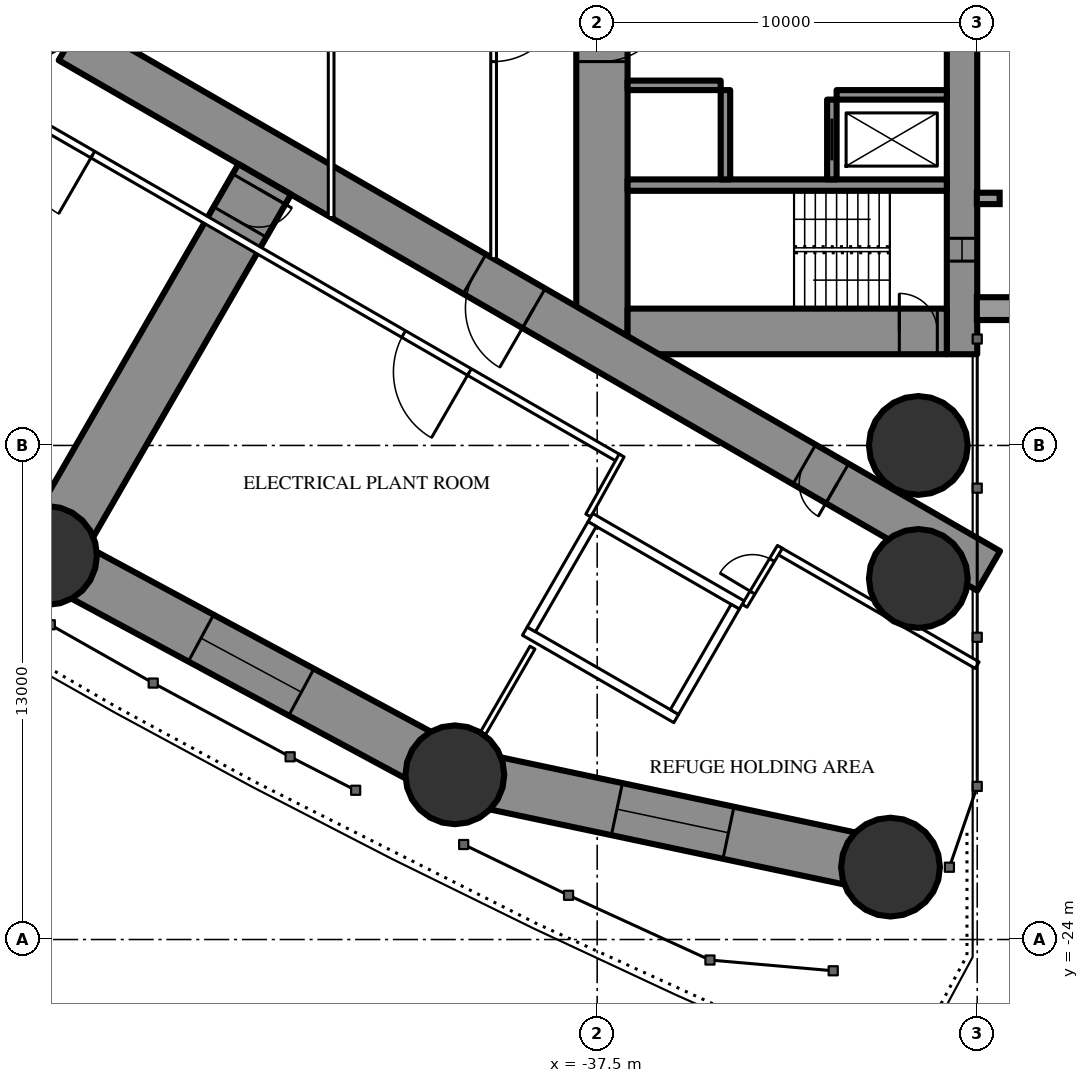
"""IFC4 building model, lengths in metres.
Left out: names, types, materials, properties, quantities, classifications, styles, units other than length and angle.
Written with IfcOpenShell. Run it as: python <this file> out.ifc"""

import sys

from ifc_helpers import new_model, si_unit, direction, frame, frame_2d, origin, origin_2d, place, context, subcontext, project, spatial, rectangle, hollow_circle, extrude, element, fill, save


model = new_model("IFC4")
c1 = context("Model", 3, precision=1e-05, world=origin(), true_north=direction((0.0, 1.0)))
c2 = subcontext(c1, "Body", "Model", "MODEL_VIEW")
j1 = project(units=[si_unit("LENGTHUNIT", "METRE"), si_unit("PLANEANGLEUNIT", "RADIAN")], contexts=[c1])
p1 = place(None, origin())
s1 = spatial("IfcSite", under=j1, at=p1, CompositionType="ELEMENT")
p2 = place(p1, origin())
s2 = spatial("IfcBuilding", under=s1, at=p2, CompositionType="ELEMENT")
p3 = place(p2, frame((0.0, 0.0, 87.0)))
s3 = spatial("IfcBuildingStorey", under=s2, at=p3, CompositionType="ELEMENT", Elevation=87.0)
for number, where, z_axis, x_axis in (
    (1, (-29.781, -22.095, 0.0), (0.0, 0.0, 1.0), (1.0, 0.0, 0.0)),
    (2, (-29.05, -11.0, 0.0), (0.0, 0.0, 1.0), (1.0, 0.0, 0.0)),
    (3, (-29.05, -14.5, 0.0), (0.0, 0.0, 1.0), (1.0, 0.0, 0.0)),
    (4, (-51.963, -13.895, 0.0), (0.0, 0.0, 1.0), (1.0, 0.0, 0.0)),
    (5, (-41.245, -19.666, 0.0), (0.0, 0.0, 1.0), (1.0, 0.0, 0.0)),
):
    element("IfcColumn", number, at=place(p3, frame(where, z_axis=z_axis, x_axis=x_axis)), inside=s3, PredefinedType="COLUMN", context=c2, shape_type="SweptSolid", body=[
        extrude(hollow_circle(Radius=1.3, WallThickness=0.1, at=origin_2d()), origin(), (0.0, 0.0, 1.0), 3.6),
    ])
p4 = place(p3, frame((-27.9, 8.6, 0.0), z_axis=(0.0, 0.0, 1.0), x_axis=(0.0, -1.0, 0.0)))
e6 = element("IfcWall", 6, at=p4, inside=s3, PredefinedType="SHEAR", context=c2, shape_type="SweptSolid", body=[
    extrude(rectangle(XDim=17.2, YDim=0.8, at=frame_2d((8.6, 0.0))), origin(), (0.0, 0.0, 1.0), 3.6),
])
p5 = place(p4, frame((2.45, 0.0, 0.6)))
e7 = element("IfcOpeningElement", 7, at=p5, cuts=e6, PredefinedType="OPENING", context=c2, shape_type="SweptSolid", body=[
    extrude(rectangle(XDim=0.6, YDim=2.1, at=frame_2d((0.3, 1.05))), frame((0.0, 0.41, 0.0), z_axis=(0.0, -1.0, 0.0), x_axis=(1.0, 0.0, 0.0)), (0.0, 0.0, 1.0), 0.82),
])
p6 = place(p4, frame((14.15, 0.0, 0.6)))
e8 = element("IfcOpeningElement", 8, at=p6, cuts=e6, PredefinedType="OPENING", context=c2, shape_type="SweptSolid", body=[
    extrude(rectangle(XDim=0.6, YDim=2.1, at=frame_2d((0.3, 1.05))), frame((0.0, 0.41, 0.0), z_axis=(0.0, -1.0, 0.0), x_axis=(1.0, 0.0, 0.0)), (0.0, 0.0, 1.0), 0.82),
])
p7 = place(p3, frame((-37.375, 8.6, 0.0), z_axis=(0.0, 0.0, 1.0), x_axis=(0.0, -1.0, 0.0)))
e9 = element("IfcWall", 9, at=p7, inside=s3, PredefinedType="SHEAR", context=c2, shape_type="SweptSolid", body=[
    extrude(rectangle(XDim=17.2, YDim=1.35, at=frame_2d((8.6, 0.0))), origin(), (0.0, 0.0, 1.0), 3.6),
])
p8 = place(p7, frame((7.7, 0.0, 0.0)))
e10 = element("IfcOpeningElement", 10, at=p8, cuts=e9, PredefinedType="OPENING", context=c2, shape_type="SweptSolid", body=[
    extrude(rectangle(XDim=1.8, YDim=2.2, at=frame_2d((0.9, 1.1))), frame((0.0, 0.685, 0.0), z_axis=(0.0, -1.0, 0.0), x_axis=(1.0, 0.0, 0.0)), (0.0, 0.0, 1.0), 1.37),
])
p9 = place(p3, frame((-28.3, -8.0, 0.0), z_axis=(0.0, 0.0, 1.0), x_axis=(-1.0, 0.0, 0.0)))
e11 = element("IfcWall", 11, at=p9, inside=s3, PredefinedType="SHEAR", context=c2, shape_type="SweptSolid", body=[
    extrude(rectangle(XDim=8.4, YDim=1.2, at=frame_2d((4.2, 0.0))), origin(), (0.0, 0.0, 1.0), 3.6),
])
p10 = place(p9, frame((0.25, 0.0, 0.0)))
e12 = element("IfcOpeningElement", 12, at=p10, cuts=e11, PredefinedType="OPENING", context=c2, shape_type="SweptSolid", body=[
    extrude(rectangle(XDim=1.0, YDim=2.2, at=frame_2d((0.5, 1.1))), frame((0.0, 0.61, 0.0), z_axis=(0.0, -1.0, 0.0), x_axis=(1.0, 0.0, 0.0)), (0.0, 0.0, 1.0), 1.22),
])
p11 = place(p3, frame((-28.3, -4.15, 0.0), z_axis=(0.0, 0.0, 1.0), x_axis=(-1.0, 0.0, 0.0)))
e13 = element("IfcWall", 13, at=p11, inside=s3, PredefinedType="SHEAR", context=c2, shape_type="SweptSolid", body=[
    extrude(rectangle(XDim=8.4, YDim=0.3, at=frame_2d((4.2, 0.0))), origin(), (0.0, 0.0, 1.0), 3.6),
])
p12 = place(p3, frame((-31.325, -1.9, 0.0), z_axis=(0.0, 0.0, 1.0), x_axis=(0.0, -1.0, 0.0)))
e14 = element("IfcWall", 14, at=p12, inside=s3, PredefinedType="SHEAR", context=c2, shape_type="SweptSolid", body=[
    extrude(rectangle(XDim=2.1, YDim=0.25, at=frame_2d((1.05, 0.0))), origin(), (0.0, 0.0, 1.0), 3.6),
])
p13 = place(p12, frame((0.5, 0.0, 0.0)))
e15 = element("IfcOpeningElement", 15, at=p13, cuts=e14, PredefinedType="OPENING", context=c2, shape_type="SweptSolid", body=[
    extrude(rectangle(XDim=1.1, YDim=2.2, at=frame_2d((0.55, 1.1))), frame((0.0, 0.135, 0.0), z_axis=(0.0, -1.0, 0.0), x_axis=(1.0, 0.0, 0.0)), (0.0, 0.0, 1.0), 0.27),
])
p14 = place(p3, frame((-34.125, -1.65, 0.0), z_axis=(0.0, 0.0, 1.0), x_axis=(0.0, -1.0, 0.0)))
e16 = element("IfcWall", 16, at=p14, inside=s3, PredefinedType="SHEAR", context=c2, shape_type="SweptSolid", body=[
    extrude(rectangle(XDim=2.35, YDim=0.25, at=frame_2d((1.175, 0.0))), origin(), (0.0, 0.0, 1.0), 3.6),
])
p15 = place(p3, frame((-28.3, -1.775, 0.0), z_axis=(0.0, 0.0, 1.0), x_axis=(-1.0, 0.0, 0.0)))
e17 = element("IfcWall", 17, at=p15, inside=s3, PredefinedType="SHEAR", context=c2, shape_type="SweptSolid", body=[
    extrude(rectangle(XDim=2.9, YDim=0.25, at=frame_2d((1.45, 0.0))), origin(), (0.0, 0.0, 1.0), 3.6),
])
p16 = place(p3, frame((-34.25, -1.525, 0.0), z_axis=(0.0, 0.0, 1.0), x_axis=(-1.0, 0.0, 0.0)))
e18 = element("IfcWall", 18, at=p16, inside=s3, PredefinedType="SHEAR", context=c2, shape_type="SweptSolid", body=[
    extrude(rectangle(XDim=2.45, YDim=0.25, at=frame_2d((1.225, 0.0))), origin(), (0.0, 0.0, 1.0), 3.6),
])
p17 = place(p3, frame((-27.2, 14.3, 0.0), z_axis=(0.0, 0.0, 1.0), x_axis=(-0.866026593062, -0.499997940104, 0.0)))
e19 = element("IfcWall", 19, at=p17, inside=s3, PredefinedType="SHEAR", context=c2, shape_type="SweptSolid", body=[
    extrude(rectangle(XDim=28.946, YDim=1.2, at=frame_2d((14.473, 0.0))), origin(), (0.0, 0.0, 1.0), 3.6),
])
p18 = place(p17, frame((4.6, 0.0, 0.0)))
e20 = element("IfcOpeningElement", 20, at=p18, cuts=e19, PredefinedType="OPENING", context=c2, shape_type="SweptSolid", body=[
    extrude(rectangle(XDim=1.0, YDim=2.2, at=frame_2d((0.5, 1.1))), frame((0.0, 0.61, 0.0), z_axis=(0.0, -1.0, 0.0), x_axis=(1.0, 0.0, 0.0)), (0.0, 0.0, 1.0), 1.22),
])
p19 = place(p17, frame((13.568, 0.0, 0.0)))
e21 = element("IfcOpeningElement", 21, at=p19, cuts=e19, PredefinedType="OPENING", context=c2, shape_type="SweptSolid", body=[
    extrude(rectangle(XDim=1.8, YDim=2.03, at=frame_2d((0.9, 1.015))), frame((0.0, 0.61, 0.0), z_axis=(0.0, -1.0, 0.0), x_axis=(1.0, 0.0, 0.0)), (0.0, 0.0, 1.0), 1.22),
])
p20 = place(p3, frame((-27.2, -14.3, 0.0), z_axis=(0.0, 0.0, 1.0), x_axis=(-0.866024021859, 0.500002393557, 0.0)))
e22 = element("IfcWall", 22, at=p20, inside=s3, PredefinedType="SHEAR", context=c2, shape_type="SweptSolid", body=[
    extrude(rectangle(XDim=27.907, YDim=1.2, at=frame_2d((13.954, 0.0))), origin(), (0.0, 0.0, 1.0), 3.6),
])
p21 = place(p20, frame((4.6, 0.0, 0.0)))
e23 = element("IfcOpeningElement", 23, at=p21, cuts=e22, PredefinedType="OPENING", context=c2, shape_type="SweptSolid", body=[
    extrude(rectangle(XDim=1.0, YDim=2.2, at=frame_2d((0.5, 1.1))), frame((0.0, 0.61, 0.0), z_axis=(0.0, -1.0, 0.0), x_axis=(1.0, 0.0, 0.0)), (0.0, 0.0, 1.0), 1.22),
])
p22 = place(p20, frame((13.818, 0.0, 0.0)))
e24 = element("IfcOpeningElement", 24, at=p22, cuts=e22, PredefinedType="OPENING", context=c2, shape_type="SweptSolid", body=[
    extrude(rectangle(XDim=1.8, YDim=2.2, at=frame_2d((0.9, 1.1))), frame((0.0, 0.61, 0.0), z_axis=(0.0, -1.0, 0.0), x_axis=(1.0, 0.0, 0.0)), (0.0, 0.0, 1.0), 1.22),
])
p23 = place(p3, frame((-46.248, -3.996, 0.0), z_axis=(0.0, 0.0, 1.0), x_axis=(-0.499993613132, -0.866029091213, 0.0)))
e25 = element("IfcWall", 25, at=p23, inside=s3, PredefinedType="SHEAR", context=c2, shape_type="SweptSolid", body=[
    extrude(rectangle(XDim=11.431, YDim=1.6, at=frame_2d((5.715, 0.0))), origin(), (0.0, 0.0, 1.0), 3.6),
])
p24 = place(p23, frame((0.3, 0.0, 0.0)))
e26 = element("IfcOpeningElement", 26, at=p24, cuts=e25, PredefinedType="OPENING", context=c2, shape_type="SweptSolid", body=[
    extrude(rectangle(XDim=1.0, YDim=2.2, at=frame_2d((0.5, 1.1))), frame((0.0, 0.81, 0.0), z_axis=(0.0, -1.0, 0.0), x_axis=(1.0, 0.0, 0.0)), (0.0, 0.0, 1.0), 1.62),
])
p25 = place(p3, frame((-62.287, -7.445, 0.0), z_axis=(0.0, 0.0, 1.0), x_axis=(0.848062521637, -0.529896177939, 0.0)))
e27 = element("IfcWall", 27, at=p25, inside=s3, PredefinedType="SHEAR", context=c2, shape_type="SweptSolid", body=[
    extrude(rectangle(XDim=12.173, YDim=1.4, at=frame_2d((6.086, 0.0))), origin(), (0.0, 0.0, 1.0), 3.6),
])
p26 = place(p25, frame((4.586, 0.0, 0.6)))
e28 = element("IfcOpeningElement", 28, at=p26, cuts=e27, PredefinedType="OPENING", context=c2, shape_type="SweptSolid", body=[
    extrude(rectangle(XDim=3.0, YDim=1.2, at=frame_2d((1.5, 0.6))), frame((0.0, 0.71, 0.0), z_axis=(0.0, -1.0, 0.0), x_axis=(1.0, 0.0, 0.0)), (0.0, 0.0, 1.0), 1.42),
])
p27 = place(p3, frame((-51.963, -13.895, 0.0), z_axis=(0.0, 0.0, 1.0), x_axis=(0.880492350889, -0.474060354835, 0.0)))
e29 = element("IfcWall", 29, at=p27, inside=s3, PredefinedType="SHEAR", context=c2, shape_type="SweptSolid", body=[
    extrude(rectangle(XDim=12.173, YDim=1.4, at=frame_2d((6.086, 0.0))), origin(), (0.0, 0.0, 1.0), 3.6),
])
p28 = place(p27, frame((4.586, 0.0, 0.6)))
e30 = element("IfcOpeningElement", 30, at=p28, cuts=e29, PredefinedType="OPENING", context=c2, shape_type="SweptSolid", body=[
    extrude(rectangle(XDim=3.0, YDim=1.2, at=frame_2d((1.5, 0.6))), frame((0.0, 0.71, 0.0), z_axis=(0.0, -1.0, 0.0), x_axis=(1.0, 0.0, 0.0)), (0.0, 0.0, 1.0), 1.42),
])
p29 = place(p3, frame((-41.245, -19.666, 0.0), z_axis=(0.0, 0.0, 1.0), x_axis=(0.978282156247, -0.207277646573, 0.0)))
e31 = element("IfcWall", 31, at=p29, inside=s3, PredefinedType="SHEAR", context=c2, shape_type="SweptSolid", body=[
    extrude(rectangle(XDim=11.718, YDim=1.4, at=frame_2d((5.859, 0.0))), origin(), (0.0, 0.0, 1.0), 3.6),
])
p30 = place(p29, frame((4.359, 0.0, 0.6)))
e32 = element("IfcOpeningElement", 32, at=p30, cuts=e31, PredefinedType="OPENING", context=c2, shape_type="SweptSolid", body=[
    extrude(rectangle(XDim=3.0, YDim=1.2, at=frame_2d((1.5, 0.6))), frame((0.0, 0.71, 0.0), z_axis=(0.0, -1.0, 0.0), x_axis=(1.0, 0.0, 0.0)), (0.0, 0.0, 1.0), 1.42),
])
p31 = place(p3, frame((-39.202, -16.32, 0.0), z_axis=(0.0, 0.0, 1.0), x_axis=(-0.49997716683, -0.86603858612, 0.0)))
e33 = element("IfcWall", 33, at=p31, inside=s3, PredefinedType="PARTITIONING", context=c2, shape_type="SweptSolid", body=[
    extrude(rectangle(XDim=2.6, YDim=0.15, at=frame_2d((1.3, 0.0))), origin(), (0.0, 0.0, 1.0), 3.35),
])
p32 = place(p3, frame((-27.5, -16.782, 0.0), z_axis=(0.0, 0.0, 1.0), x_axis=(-0.866030050624, 0.499991951352, 0.0)))
e34 = element("IfcWall", 34, at=p32, inside=s3, PredefinedType="PARTITIONING", context=c2, shape_type="SweptSolid", body=[
    extrude(rectangle(XDim=6.038, YDim=0.2, at=frame_2d((3.019, 0.0))), origin(), (0.0, 0.0, 1.0), 3.35),
])
p33 = place(p3, frame((-36.92, -11.344, 0.0), z_axis=(0.0, 0.0, 1.0), x_axis=(-0.866028313256, 0.499994960614, 0.0)))
e35 = element("IfcWall", 35, at=p33, inside=s3, PredefinedType="PARTITIONING", context=c2, shape_type="SweptSolid", body=[
    extrude(rectangle(XDim=22.568, YDim=0.2, at=frame_2d((11.284, 0.0))), origin(), (0.0, 0.0, 1.0), 3.35),
])
p34 = place(p33, frame((15.994, 0.0, 0.0)))
e36 = element("IfcOpeningElement", 36, at=p34, cuts=e35, PredefinedType="OPENING", context=c2, shape_type="SweptSolid", body=[
    extrude(rectangle(XDim=1.8, YDim=2.2, at=frame_2d((0.9, 1.1))), frame((0.0, 0.11, 0.0), z_axis=(0.0, -1.0, 0.0), x_axis=(1.0, 0.0, 0.0)), (0.0, 0.0, 1.0), 0.22),
])
p35 = place(p33, frame((4.551, 0.0, 0.0)))
e37 = element("IfcOpeningElement", 37, at=p35, cuts=e35, PredefinedType="OPENING", context=c2, shape_type="SweptSolid", body=[
    extrude(rectangle(XDim=2.0, YDim=2.4, at=frame_2d((1.0, 1.2))), frame((0.0, 0.11, 0.0), z_axis=(0.0, -1.0, 0.0), x_axis=(1.0, 0.0, 0.0)), (0.0, 0.0, 1.0), 0.22),
])
p36 = place(p3, frame((-36.857, -11.265, 0.0), z_axis=(0.0, 0.0, 1.0), x_axis=(-0.485482130951, -0.874246590229, 0.0)))
e38 = element("IfcWall", 38, at=p36, inside=s3, PredefinedType="PARTITIONING", context=c2, shape_type="SweptSolid", body=[
    extrude(rectangle(XDim=1.805, YDim=0.15, at=frame_2d((0.902, 0.0))), origin(), (0.0, 0.0, 1.0), 3.35),
])
p37 = place(p3, frame((-33.621, -15.218, 0.0), z_axis=(0.0, 0.0, 1.0), x_axis=(0.514336634837, 0.857588377991, 0.0)))
e39 = element("IfcWall", 39, at=p37, inside=s3, PredefinedType="PARTITIONING", context=c2, shape_type="SweptSolid", body=[
    extrude(rectangle(XDim=1.805, YDim=0.15, at=frame_2d((0.903, 0.0))), origin(), (0.0, 0.0, 1.0), 3.35),
])
p38 = place(p37, frame((0.403, 0.0, 0.0)))
e40 = element("IfcOpeningElement", 40, at=p38, cuts=e39, PredefinedType="OPENING", context=c2, shape_type="SweptSolid", body=[
    extrude(rectangle(XDim=1.0, YDim=2.03, at=frame_2d((0.5, 1.015))), frame((0.0, 0.085, 0.0), z_axis=(0.0, -1.0, 0.0), x_axis=(1.0, 0.0, 0.0)), (0.0, 0.0, 1.0), 0.17),
])
p39 = place(p3, frame((-40.225, 6.087, 0.0), z_axis=(0.0, 0.0, 1.0), x_axis=(0.0, -1.0, 0.0)))
e41 = element("IfcWall", 41, at=p39, inside=s3, PredefinedType="PARTITIONING", context=c2, shape_type="SweptSolid", body=[
    extrude(rectangle(XDim=12.174, YDim=0.15, at=frame_2d((6.087, 0.0))), origin(), (0.0, 0.0, 1.0), 3.35),
])
p40 = place(p39, frame((5.187, 0.0, 0.0)))
e42 = element("IfcOpeningElement", 42, at=p40, cuts=e41, PredefinedType="OPENING", context=c2, shape_type="SweptSolid", body=[
    extrude(rectangle(XDim=1.8, YDim=2.2, at=frame_2d((0.9, 1.1))), frame((0.0, 0.085, 0.0), z_axis=(0.0, -1.0, 0.0), x_axis=(1.0, 0.0, 0.0)), (0.0, 0.0, 1.0), 0.17),
])
p41 = place(p3, frame((-44.5, 4.169, 0.0), z_axis=(0.0, 0.0, 1.0), x_axis=(0.0, -1.0, 0.0)))
e43 = element("IfcWall", 43, at=p41, inside=s3, PredefinedType="PARTITIONING", context=c2, shape_type="SweptSolid", body=[
    extrude(rectangle(XDim=9.173, YDim=0.15, at=frame_2d((4.587, 0.0))), origin(), (0.0, 0.0, 1.0), 3.35),
])
p42 = place(p41, frame((3.669, 0.0, 0.0)))
e44 = element("IfcOpeningElement", 44, at=p42, cuts=e43, PredefinedType="OPENING", context=c2, shape_type="SweptSolid", body=[
    extrude(rectangle(XDim=1.0, YDim=2.2, at=frame_2d((0.5, 1.1))), frame((0.0, 0.085, 0.0), z_axis=(0.0, -1.0, 0.0), x_axis=(1.0, 0.0, 0.0)), (0.0, 0.0, 1.0), 0.17),
])
p43 = place(p3, frame((-33.696, -15.197, 0.0), z_axis=(0.0, 0.0, 1.0), x_axis=(-0.865976953817, 0.500083908417, 0.0)))
e45 = element("IfcWall", 45, at=p43, inside=s3, PredefinedType="PARTITIONING", context=c2, shape_type="SweptSolid", body=[
    extrude(rectangle(XDim=4.599, YDim=0.25, at=frame_2d((2.3, 0.0))), origin(), (0.0, 0.0, 1.0), 3.35),
])
p44 = place(p3, frame((-35.42, -18.186, 0.0), z_axis=(0.0, 0.0, 1.0), x_axis=(-0.865990227814, 0.50006092162, 0.0)))
e46 = element("IfcWall", 46, at=p44, inside=s3, PredefinedType="PARTITIONING", context=c2, shape_type="SweptSolid", body=[
    extrude(rectangle(XDim=4.6, YDim=0.25, at=frame_2d((2.3, 0.0))), origin(), (0.0, 0.0, 1.0), 3.35),
])
p45 = place(p3, frame((-33.866, -15.243, 0.0), z_axis=(0.0, 0.0, 1.0), x_axis=(-0.499929347863, -0.866066190972, 0.0)))
e47 = element("IfcWall", 47, at=p45, inside=s3, PredefinedType="PARTITIONING", context=c2, shape_type="SweptSolid", body=[
    extrude(rectangle(XDim=3.201, YDim=0.25, at=frame_2d((1.6, 0.0))), origin(), (0.0, 0.0, 1.0), 3.35),
])
p46 = place(p3, frame((-37.633, -13.068, 0.0), z_axis=(0.0, 0.0, 1.0), x_axis=(-0.499872130319, -0.866099216793, 0.0)))
e48 = element("IfcWall", 48, at=p46, inside=s3, PredefinedType="PARTITIONING", context=c2, shape_type="SweptSolid", body=[
    extrude(rectangle(XDim=3.2, YDim=0.25, at=frame_2d((1.6, 0.0))), origin(), (0.0, 0.0, 1.0), 3.35),
])
p47 = place(p28, origin())
e49 = element("IfcWindow", 49, at=p47, inside=s3, PartitioningType="SINGLE_PANEL", PredefinedType="WINDOW", context=c2, shape_type="SweptSolid", body=[
    extrude(rectangle(XDim=3.0, YDim=1.2, at=frame_2d((1.5, 0.6))), frame((0.0, 0.03, 0.0), z_axis=(0.0, -1.0, 0.0), x_axis=(1.0, 0.0, 0.0)), (0.0, 0.0, 1.0), 0.06),
])
fill(e30, e49)
p48 = place(p30, origin())
e50 = element("IfcWindow", 50, at=p48, inside=s3, PartitioningType="SINGLE_PANEL", PredefinedType="WINDOW", context=c2, shape_type="SweptSolid", body=[
    extrude(rectangle(XDim=3.0, YDim=1.2, at=frame_2d((1.5, 0.6))), frame((0.0, 0.03, 0.0), z_axis=(0.0, -1.0, 0.0), x_axis=(1.0, 0.0, 0.0)), (0.0, 0.0, 1.0), 0.06),
])
fill(e32, e50)
p49 = place(p24, origin())
e51 = element("IfcDoor", 51, at=p49, inside=s3, OperationType="SINGLE_SWING_LEFT", PredefinedType="DOOR", context=c2, shape_type="SweptSolid", body=[
    extrude(rectangle(XDim=1.0, YDim=2.2, at=frame_2d((0.5, 1.1))), frame((0.0, 0.025, 0.0), z_axis=(0.0, -1.0, 0.0), x_axis=(1.0, 0.0, 0.0)), (0.0, 0.0, 1.0), 0.05),
])
fill(e26, e51)
p50 = place(p34, origin())
e52 = element("IfcDoor", 52, at=p50, inside=s3, OperationType="DOUBLE_DOOR_SINGLE_SWING", PredefinedType="DOOR", context=c2, shape_type="SweptSolid", body=[
    extrude(rectangle(XDim=1.8, YDim=2.2, at=frame_2d((0.9, 1.1))), frame((0.0, 0.025, 0.0), z_axis=(0.0, -1.0, 0.0), x_axis=(1.0, 0.0, 0.0)), (0.0, 0.0, 1.0), 0.05),
])
fill(e36, e52)
p51 = place(p35, origin())
e53 = element("IfcDoor", 53, at=p51, inside=s3, OperationType="DOUBLE_DOOR_SINGLE_SWING", PredefinedType="DOOR", context=c2, shape_type="SweptSolid", body=[
    extrude(rectangle(XDim=2.0, YDim=2.4, at=frame_2d((1.0, 1.2))), frame((0.0, 0.025, 0.0), z_axis=(0.0, -1.0, 0.0), x_axis=(1.0, 0.0, 0.0)), (0.0, 0.0, 1.0), 0.05),
])
fill(e37, e53)
p52 = place(p38, origin())
e54 = element("IfcDoor", 54, at=p52, inside=s3, OperationType="SINGLE_SWING_LEFT", PredefinedType="DOOR", context=c2, shape_type="SweptSolid", body=[
    extrude(rectangle(XDim=1.0, YDim=2.03, at=frame_2d((0.5, 1.015))), frame((0.0, 0.025, 0.0), z_axis=(0.0, -1.0, 0.0), x_axis=(1.0, 0.0, 0.0)), (0.0, 0.0, 1.0), 0.05),
])
fill(e40, e54)
p53 = place(p40, origin())
e55 = element("IfcDoor", 55, at=p53, inside=s3, OperationType="DOUBLE_DOOR_SINGLE_SWING", PredefinedType="DOOR", context=c2, shape_type="SweptSolid", body=[
    extrude(rectangle(XDim=1.8, YDim=2.2, at=frame_2d((0.9, 1.1))), frame((0.0, 0.025, 0.0), z_axis=(0.0, -1.0, 0.0), x_axis=(1.0, 0.0, 0.0)), (0.0, 0.0, 1.0), 0.05),
])
fill(e42, e55)
p54 = place(p21, origin())
e56 = element("IfcDoor", 56, at=p54, inside=s3, OperationType="SINGLE_SWING_LEFT", PredefinedType="DOOR", context=c2, shape_type="SweptSolid", body=[
    extrude(rectangle(XDim=1.0, YDim=2.2, at=frame_2d((0.5, 1.1))), frame((0.0, 0.025, 0.0), z_axis=(0.0, -1.0, 0.0), x_axis=(1.0, 0.0, 0.0)), (0.0, 0.0, 1.0), 0.05),
])
fill(e23, e56)
p55 = place(p22, origin())
e57 = element("IfcDoor", 57, at=p55, inside=s3, OperationType="DOUBLE_DOOR_SINGLE_SWING", PredefinedType="DOOR", context=c2, shape_type="SweptSolid", body=[
    extrude(rectangle(XDim=1.8, YDim=2.2, at=frame_2d((0.9, 1.1))), frame((0.0, 0.025, 0.0), z_axis=(0.0, -1.0, 0.0), x_axis=(1.0, 0.0, 0.0)), (0.0, 0.0, 1.0), 0.05),
])
fill(e24, e57)
p56 = place(p8, origin())
e58 = element("IfcDoor", 58, at=p56, inside=s3, OperationType="DOUBLE_DOOR_SINGLE_SWING", PredefinedType="DOOR", context=c2, shape_type="SweptSolid", body=[
    extrude(rectangle(XDim=1.8, YDim=2.2, at=frame_2d((0.9, 1.1))), frame((0.0, 0.025, 0.0), z_axis=(0.0, -1.0, 0.0), x_axis=(1.0, 0.0, 0.0)), (0.0, 0.0, 1.0), 0.05),
])
fill(e10, e58)
p57 = place(p10, origin())
e59 = element("IfcDoor", 59, at=p57, inside=s3, OperationType="SINGLE_SWING_RIGHT", PredefinedType="DOOR", context=c2, shape_type="SweptSolid", body=[
    extrude(rectangle(XDim=1.0, YDim=2.2, at=frame_2d((0.5, 1.1))), frame((0.0, 0.025, 0.0), z_axis=(0.0, -1.0, 0.0), x_axis=(1.0, 0.0, 0.0)), (0.0, 0.0, 1.0), 0.05),
])
fill(e12, e59)
p58 = place(p13, origin())
e60 = element("IfcDoor", 60, at=p58, inside=s3, OperationType="SLIDING_TO_LEFT", PredefinedType="USERDEFINED", context=c2, shape_type="SweptSolid", body=[
    extrude(rectangle(XDim=1.1, YDim=2.2, at=frame_2d((0.55, 1.1))), frame((0.0, 0.025, 0.0), z_axis=(0.0, -1.0, 0.0), x_axis=(1.0, 0.0, 0.0)), (0.0, 0.0, 1.0), 0.05),
])
fill(e15, e60)
p59 = place(p6, origin())
e61 = element("IfcWindow", 61, at=p59, inside=s3, PartitioningType="SINGLE_PANEL", PredefinedType="WINDOW", context=c2, shape_type="SweptSolid", body=[
    extrude(rectangle(XDim=0.6, YDim=2.1, at=frame_2d((0.3, 1.05))), frame((0.0, 0.03, 0.0), z_axis=(0.0, -1.0, 0.0), x_axis=(1.0, 0.0, 0.0)), (0.0, 0.0, 1.0), 0.06),
])
fill(e8, e61)
save(model, sys.argv[1])
